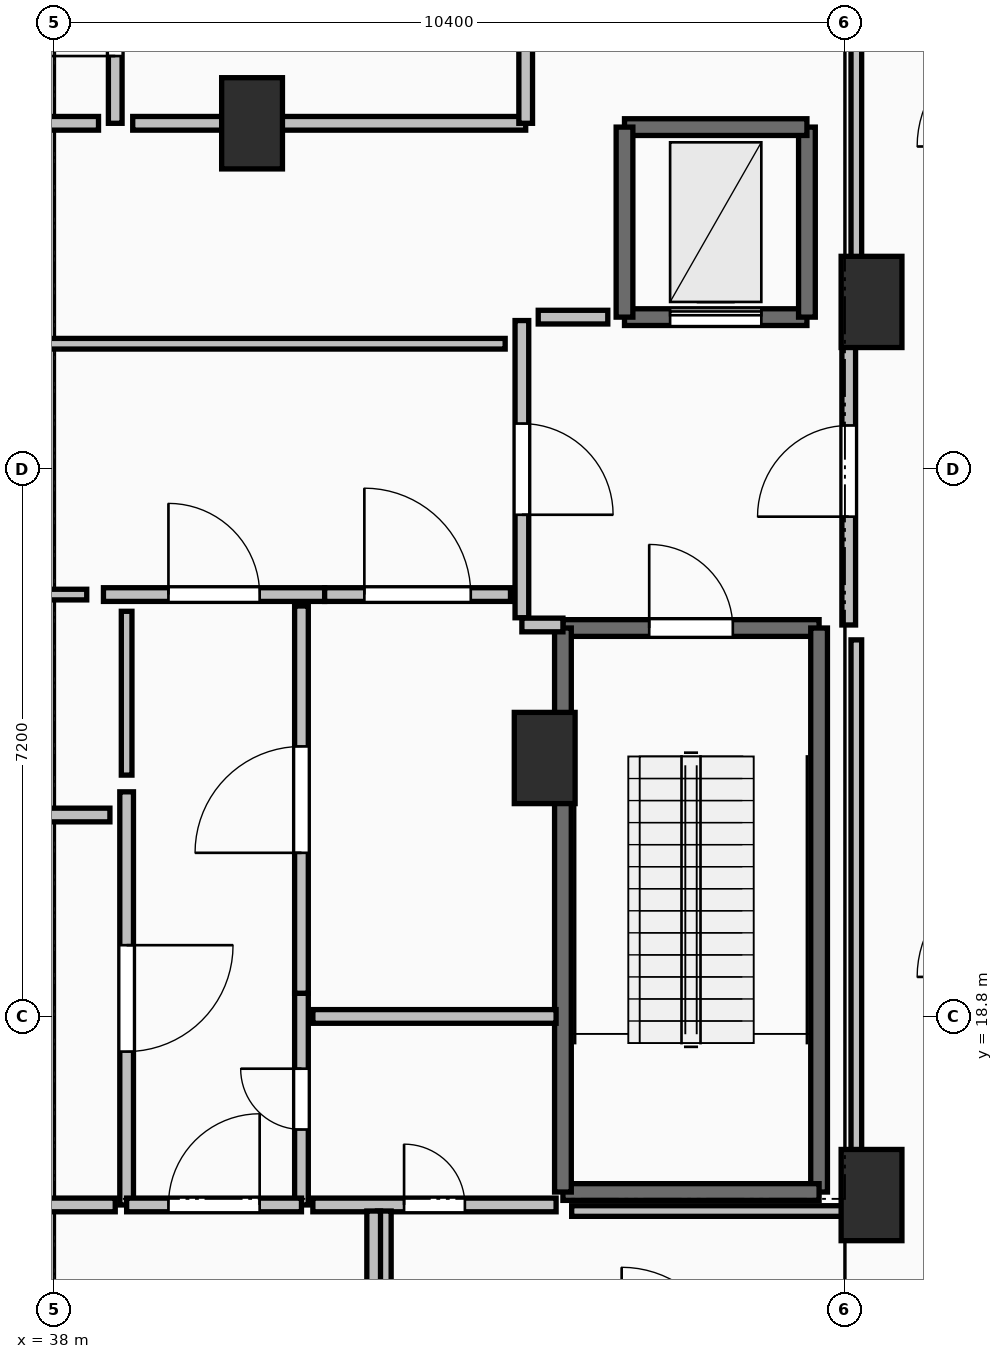
"""IFC4 building model, lengths in metres.
Left out: names, types, materials, properties, quantities, classifications, styles, units other than length and angle.
Written with IfcOpenShell. Run it as: python <this file> out.ifc"""

import sys

from ifc_helpers import new_model, si_unit, direction, frame, frame_2d, origin, origin_2d, place, context, subcontext, project, spatial, rectangle, extrude, element, fill, save


model = new_model("IFC4")
c1 = context("Model", 3, precision=1e-05, world=origin(), true_north=direction((0.0, 1.0)))
c2 = subcontext(c1, "Body", "Model", "MODEL_VIEW")
j1 = project(units=[si_unit("LENGTHUNIT", "METRE"), si_unit("PLANEANGLEUNIT", "RADIAN")], contexts=[c1])
p1 = place(None, origin())
s1 = spatial("IfcSite", under=j1, at=p1, CompositionType="ELEMENT")
p2 = place(p1, origin())
s2 = spatial("IfcBuilding", under=s1, at=p2, CompositionType="ELEMENT")
p3 = place(p2, frame((0.0, 0.0, -9.6)))
s3 = spatial("IfcBuildingStorey", under=s2, at=p3, CompositionType="ELEMENT", Elevation=-9.6)
for number, where, z_axis, x_axis in (
    (1, (48.75, 28.2, 0.0), (0.0, 0.0, 1.0), (1.0, 0.0, 0.0)),
    (2, (48.75, 16.45, 0.0), (0.0, 0.0, 1.0), (1.0, 0.0, 0.0)),
    (3, (44.45, 22.2, 0.0), (0.0, 0.0, 1.0), (1.0, 0.0, 0.0)),
    (4, (40.6, 30.55, 0.0), (0.0, 0.0, 1.0), (1.0, 0.0, 0.0)),
):
    element("IfcColumn", number, at=place(p3, frame(where, z_axis=z_axis, x_axis=x_axis)), inside=s3, PredefinedType="PILASTER", context=c2, shape_type="SweptSolid", body=[
        extrude(rectangle(XDim=0.8, YDim=1.2, at=origin_2d()), origin(), (0.0, 0.0, 1.0), 4.8),
    ])
p4 = place(p3, frame((44.69, 23.91, 0.0), z_axis=(0.0, 0.0, 1.0), x_axis=(1.0, 0.0, 0.0)))
e5 = element("IfcWall", 5, at=p4, inside=s3, PredefinedType="SOLIDWALL", context=c2, shape_type="SweptSolid", body=[
    extrude(rectangle(XDim=3.37, YDim=0.22, at=frame_2d((1.685, 0.0))), origin(), (0.0, 0.0, 1.0), 4.45),
])
p5 = place(p4, frame((1.135, 0.0, 0.0)))
e6 = element("IfcOpeningElement", 6, at=p5, cuts=e5, PredefinedType="OPENING", context=c2, shape_type="SweptSolid", body=[
    extrude(rectangle(XDim=1.1, YDim=2.15, at=frame_2d((0.55, 1.075))), frame((0.0, 0.125, 0.0), z_axis=(0.0, -1.0, 0.0), x_axis=(1.0, 0.0, 0.0)), (0.0, 0.0, 1.0), 0.25),
])
p6 = place(p3, frame((48.06, 23.91, 0.0), z_axis=(0.0, 0.0, 1.0), x_axis=(0.0, -1.0, 0.0)))
e7 = element("IfcWall", 7, at=p6, inside=s3, PredefinedType="SOLIDWALL", context=c2, shape_type="SweptSolid", body=[
    extrude(rectangle(XDim=7.42, YDim=0.22, at=frame_2d((3.71, 0.0))), origin(), (0.0, 0.0, 1.0), 4.45),
])
p7 = place(p3, frame((48.06, 16.49, 0.0), z_axis=(0.0, 0.0, 1.0), x_axis=(-1.0, 0.0, 0.0)))
e8 = element("IfcWall", 8, at=p7, inside=s3, PredefinedType="SOLIDWALL", context=c2, shape_type="SweptSolid", body=[
    extrude(rectangle(XDim=3.37, YDim=0.22, at=frame_2d((1.685, 0.0))), origin(), (0.0, 0.0, 1.0), 4.45),
])
p8 = place(p3, frame((44.69, 16.49, 0.0), z_axis=(0.0, 0.0, 1.0), x_axis=(0.0, 1.0, 0.0)))
e9 = element("IfcWall", 9, at=p8, inside=s3, PredefinedType="SOLIDWALL", context=c2, shape_type="SweptSolid", body=[
    extrude(rectangle(XDim=7.42, YDim=0.22, at=frame_2d((3.71, 0.0))), origin(), (0.0, 0.0, 1.0), 4.45),
])
p9 = place(p3, frame((45.5, 28.0, 0.0), z_axis=(0.0, 0.0, 1.0), x_axis=(1.0, 0.0, 0.0)))
e10 = element("IfcWall", 10, at=p9, inside=s3, PredefinedType="SHEAR", context=c2, shape_type="SweptSolid", body=[
    extrude(rectangle(XDim=2.4, YDim=0.22, at=frame_2d((1.2, 0.0))), origin(), (0.0, 0.0, 1.0), 4.45),
])
p10 = place(p9, frame((0.6, 0.0, 0.0)))
e11 = element("IfcOpeningElement", 11, at=p10, cuts=e10, PredefinedType="OPENING", context=c2, shape_type="SweptSolid", body=[
    extrude(rectangle(XDim=1.2, YDim=2.2, at=frame_2d((0.6, 1.1))), frame((0.0, 0.125, 0.0), z_axis=(0.0, -1.0, 0.0), x_axis=(1.0, 0.0, 0.0)), (0.0, 0.0, 1.0), 0.25),
])
p11 = place(p3, frame((47.9, 28.0, 0.0), z_axis=(0.0, 0.0, 1.0), x_axis=(0.0, 1.0, 0.0)))
e12 = element("IfcWall", 12, at=p11, inside=s3, PredefinedType="SHEAR", context=c2, shape_type="SweptSolid", body=[
    extrude(rectangle(XDim=2.5, YDim=0.22, at=frame_2d((1.25, 0.0))), origin(), (0.0, 0.0, 1.0), 4.45),
])
p12 = place(p3, frame((47.9, 30.5, 0.0), z_axis=(0.0, 0.0, 1.0), x_axis=(-1.0, 0.0, 0.0)))
e13 = element("IfcWall", 13, at=p12, inside=s3, PredefinedType="SHEAR", context=c2, shape_type="SweptSolid", body=[
    extrude(rectangle(XDim=2.4, YDim=0.22, at=frame_2d((1.2, 0.0))), origin(), (0.0, 0.0, 1.0), 4.45),
])
p13 = place(p3, frame((45.5, 30.5, 0.0), z_axis=(0.0, 0.0, 1.0), x_axis=(0.0, -1.0, 0.0)))
e14 = element("IfcWall", 14, at=p13, inside=s3, PredefinedType="SHEAR", context=c2, shape_type="SweptSolid", body=[
    extrude(rectangle(XDim=2.5, YDim=0.22, at=frame_2d((1.25, 0.0))), origin(), (0.0, 0.0, 1.0), 4.45),
])
p14 = place(p3, frame((44.15, 27.955, 0.0), z_axis=(0.0, 0.0, 1.0), x_axis=(0.0, -1.0, 0.0)))
e15 = element("IfcWall", 15, at=p14, inside=s3, PredefinedType="PARTITIONING", context=c2, shape_type="SweptSolid", body=[
    extrude(rectangle(XDim=3.91, YDim=0.18, at=frame_2d((1.955, 0.0))), origin(), (0.0, 0.0, 1.0), 4.45),
])
p15 = place(p14, frame((1.355, 0.0, 0.0)))
e16 = element("IfcOpeningElement", 16, at=p15, cuts=e15, PredefinedType="OPENING", context=c2, shape_type="SweptSolid", body=[
    extrude(rectangle(XDim=1.2, YDim=2.15, at=frame_2d((0.6, 1.075))), frame((0.0, 0.105, 0.0), z_axis=(0.0, -1.0, 0.0), x_axis=(1.0, 0.0, 0.0)), (0.0, 0.0, 1.0), 0.21),
])
p16 = place(p3, frame((44.15, 23.95, 0.0), z_axis=(0.0, 0.0, 1.0), x_axis=(1.0, 0.0, 0.0)))
e17 = element("IfcWall", 17, at=p16, inside=s3, PredefinedType="PARTITIONING", context=c2, shape_type="SweptSolid", body=[
    extrude(rectangle(XDim=0.54, YDim=0.18, at=frame_2d((0.27, 0.0))), origin(), (0.0, 0.0, 1.0), 4.45),
])
p17 = place(p3, frame((48.45, 23.95, 0.0), z_axis=(0.0, 0.0, 1.0), x_axis=(0.0, 1.0, 0.0)))
e18 = element("IfcWall", 18, at=p17, inside=s3, PredefinedType="PARTITIONING", context=c2, shape_type="SweptSolid", body=[
    extrude(rectangle(XDim=4.05, YDim=0.18, at=frame_2d((2.025, 0.0))), origin(), (0.0, 0.0, 1.0), 3.03),
])
p18 = place(p17, frame((1.425, 0.0, 0.0)))
e19 = element("IfcOpeningElement", 19, at=p18, cuts=e18, PredefinedType="OPENING", context=c2, shape_type="SweptSolid", body=[
    extrude(rectangle(XDim=1.2, YDim=2.15, at=frame_2d((0.6, 1.075))), frame((0.0, 0.105, 0.0), z_axis=(0.0, -1.0, 0.0), x_axis=(1.0, 0.0, 0.0)), (0.0, 0.0, 1.0), 0.21),
])
p19 = place(p3, frame((38.645, 24.35, 0.0), z_axis=(0.0, 0.0, 1.0), x_axis=(1.0, 0.0, 0.0)))
e20 = element("IfcWall", 20, at=p19, inside=s3, PredefinedType="PARTITIONING", context=c2, shape_type="SweptSolid", body=[
    extrude(rectangle(XDim=2.91, YDim=0.18, at=frame_2d((1.455, 0.0))), origin(), (0.0, 0.0, 1.0), 4.45),
])
p20 = place(p19, frame((0.855, 0.0, 0.0)))
e21 = element("IfcOpeningElement", 21, at=p20, cuts=e20, PredefinedType="OPENING", context=c2, shape_type="SweptSolid", body=[
    extrude(rectangle(XDim=1.2, YDim=2.15, at=frame_2d((0.6, 1.075))), frame((0.0, 0.105, 0.0), z_axis=(0.0, -1.0, 0.0), x_axis=(1.0, 0.0, 0.0)), (0.0, 0.0, 1.0), 0.21),
])
p21 = place(p3, frame((41.555, 24.35, 0.0), z_axis=(0.0, 0.0, 1.0), x_axis=(1.0, 0.0, 0.0)))
e22 = element("IfcWall", 22, at=p21, inside=s3, PredefinedType="PARTITIONING", context=c2, shape_type="SweptSolid", body=[
    extrude(rectangle(XDim=2.445, YDim=0.18, at=frame_2d((1.223, 0.0))), origin(), (0.0, 0.0, 1.0), 4.45),
])
p22 = place(p21, frame((0.522, 0.0, 0.0)))
e23 = element("IfcOpeningElement", 23, at=p22, cuts=e22, PredefinedType="OPENING", context=c2, shape_type="SweptSolid", body=[
    extrude(rectangle(XDim=1.4, YDim=2.2, at=frame_2d((0.7, 1.1))), frame((0.0, 0.105, 0.0), z_axis=(0.0, -1.0, 0.0), x_axis=(1.0, 0.0, 0.0)), (0.0, 0.0, 1.0), 0.21),
])
p23 = place(p3, frame((38.95, 21.755, 0.0), z_axis=(0.0, 0.0, 1.0), x_axis=(0.0, -1.0, 0.0)))
e24 = element("IfcWall", 24, at=p23, inside=s3, PredefinedType="PARTITIONING", context=c2, shape_type="SweptSolid", body=[
    extrude(rectangle(XDim=5.435, YDim=0.18, at=frame_2d((2.717, 0.0))), origin(), (0.0, 0.0, 1.0), 3.03),
])
p24 = place(p23, frame((2.018, 0.0, 0.0)))
e25 = element("IfcOpeningElement", 25, at=p24, cuts=e24, PredefinedType="OPENING", context=c2, shape_type="SweptSolid", body=[
    extrude(rectangle(XDim=1.4, YDim=2.2, at=frame_2d((0.7, 1.1))), frame((0.0, 0.105, 0.0), z_axis=(0.0, -1.0, 0.0), x_axis=(1.0, 0.0, 0.0)), (0.0, 0.0, 1.0), 0.21),
])
p25 = place(p3, frame((41.25, 16.32, 0.0), z_axis=(0.0, 0.0, 1.0), x_axis=(0.0, 1.0, 0.0)))
e26 = element("IfcWall", 26, at=p25, inside=s3, PredefinedType="PARTITIONING", context=c2, shape_type="SweptSolid", body=[
    extrude(rectangle(XDim=2.785, YDim=0.18, at=frame_2d((1.393, 0.0))), origin(), (0.0, 0.0, 1.0), 4.45),
])
p26 = place(p25, frame((0.992, 0.0, 0.0)))
e27 = element("IfcOpeningElement", 27, at=p26, cuts=e26, PredefinedType="OPENING", context=c2, shape_type="SweptSolid", body=[
    extrude(rectangle(XDim=0.8, YDim=2.05, at=frame_2d((0.4, 1.025))), frame((0.0, 0.105, 0.0), z_axis=(0.0, -1.0, 0.0), x_axis=(1.0, 0.0, 0.0)), (0.0, 0.0, 1.0), 0.21),
])
p27 = place(p3, frame((41.25, 19.105, 0.0), z_axis=(0.0, 0.0, 1.0), x_axis=(0.0, 1.0, 0.0)))
e28 = element("IfcWall", 28, at=p27, inside=s3, PredefinedType="PARTITIONING", context=c2, shape_type="SweptSolid", body=[
    extrude(rectangle(XDim=5.095, YDim=0.18, at=frame_2d((2.547, 0.0))), origin(), (0.0, 0.0, 1.0), 3.03),
])
p28 = place(p27, frame((1.847, 0.0, 0.0)))
e29 = element("IfcOpeningElement", 29, at=p28, cuts=e28, PredefinedType="OPENING", context=c2, shape_type="SweptSolid", body=[
    extrude(rectangle(XDim=1.4, YDim=2.2, at=frame_2d((0.7, 1.1))), frame((0.0, 0.105, 0.0), z_axis=(0.0, -1.0, 0.0), x_axis=(1.0, 0.0, 0.0)), (0.0, 0.0, 1.0), 0.21),
])
p29 = place(p3, frame((38.95, 16.32, 0.0), z_axis=(0.0, 0.0, 1.0), x_axis=(1.0, 0.0, 0.0)))
e30 = element("IfcWall", 30, at=p29, inside=s3, PredefinedType="PARTITIONING", context=c2, shape_type="SweptSolid", body=[
    extrude(rectangle(XDim=2.3, YDim=0.18, at=frame_2d((1.15, 0.0))), origin(), (0.0, 0.0, 1.0), 4.45),
])
p30 = place(p29, frame((0.55, 0.0, 0.0)))
e31 = element("IfcOpeningElement", 31, at=p30, cuts=e30, PredefinedType="OPENING", context=c2, shape_type="SweptSolid", body=[
    extrude(rectangle(XDim=1.2, YDim=2.15, at=frame_2d((0.6, 1.075))), frame((0.0, 0.105, 0.0), z_axis=(0.0, -1.0, 0.0), x_axis=(1.0, 0.0, 0.0)), (0.0, 0.0, 1.0), 0.21),
])
p31 = place(p3, frame((38.8, 30.55, 0.0), z_axis=(0.0, 0.0, 1.0), x_axis=(0.0, 1.0, 0.0)))
e32 = element("IfcWall", 32, at=p31, inside=s3, PredefinedType="PARTITIONING", context=c2, shape_type="SweptSolid", body=[
    extrude(rectangle(XDim=3.17, YDim=0.18, at=frame_2d((1.585, 0.0))), origin(), (0.0, 0.0, 1.0), 3.03),
])
p32 = place(p31, frame((0.885, 0.0, 0.0)))
e33 = element("IfcOpeningElement", 33, at=p32, cuts=e32, PredefinedType="OPENING", context=c2, shape_type="SweptSolid", body=[
    extrude(rectangle(XDim=1.4, YDim=2.2, at=frame_2d((0.7, 1.1))), frame((0.0, 0.105, 0.0), z_axis=(0.0, -1.0, 0.0), x_axis=(1.0, 0.0, 0.0)), (0.0, 0.0, 1.0), 0.21),
])
p33 = place(p3, frame((31.4, 16.32, 0.0), z_axis=(0.0, 0.0, 1.0), x_axis=(1.0, 0.0, 0.0)))
e34 = element("IfcWall", 34, at=p33, inside=s3, PredefinedType="PARTITIONING", context=c2, shape_type="SweptSolid", body=[
    extrude(rectangle(XDim=7.4, YDim=0.18, at=frame_2d((3.7, 0.0))), origin(), (0.0, 0.0, 1.0), 4.45),
])
p34 = place(p33, frame((3.0, 0.0, 0.0)))
e35 = element("IfcOpeningElement", 35, at=p34, cuts=e34, PredefinedType="OPENING", context=c2, shape_type="SweptSolid", body=[
    extrude(rectangle(XDim=1.4, YDim=2.2, at=frame_2d((0.7, 1.1))), frame((0.0, 0.105, 0.0), z_axis=(0.0, -1.0, 0.0), x_axis=(1.0, 0.0, 0.0)), (0.0, 0.0, 1.0), 0.21),
])
p35 = place(p3, frame((44.6, 18.8, 0.0), z_axis=(0.0, 0.0, 1.0), x_axis=(-1.0, 0.0, 0.0)))
e36 = element("IfcWall", 36, at=p35, inside=s3, PredefinedType="PARTITIONING", context=c2, shape_type="SweptSolid", body=[
    extrude(rectangle(XDim=3.2, YDim=0.18, at=frame_2d((1.6, 0.0))), origin(), (0.0, 0.0, 1.0), 4.45),
])
p36 = place(p3, frame((41.4, 16.32, 0.0), z_axis=(0.0, 0.0, 1.0), x_axis=(1.0, 0.0, 0.0)))
e37 = element("IfcWall", 37, at=p36, inside=s3, PredefinedType="PARTITIONING", context=c2, shape_type="SweptSolid", body=[
    extrude(rectangle(XDim=3.2, YDim=0.18, at=frame_2d((1.6, 0.0))), origin(), (0.0, 0.0, 1.0), 4.45),
])
p37 = place(p36, frame((1.2, 0.0, 0.0)))
e38 = element("IfcOpeningElement", 38, at=p37, cuts=e37, PredefinedType="OPENING", context=c2, shape_type="SweptSolid", body=[
    extrude(rectangle(XDim=0.8, YDim=2.05, at=frame_2d((0.4, 1.025))), frame((0.0, 0.105, 0.0), z_axis=(0.0, -1.0, 0.0), x_axis=(1.0, 0.0, 0.0)), (0.0, 0.0, 1.0), 0.21),
])
for number, where, z_axis, x_axis in (
    (39, (42.34, 16.24, 0.0), (0.0, 0.0, 1.0), (0.0, -1.0, 0.0)),
    (40, (42.2, 14.1, 0.0), (0.0, 0.0, 1.0), (0.0, 1.0, 0.0)),
):
    element("IfcWall", number, at=place(p3, frame(where, z_axis=z_axis, x_axis=x_axis)), inside=s3, PredefinedType="PARTITIONING", context=c2, shape_type="SweptSolid", body=[
        extrude(rectangle(XDim=2.14, YDim=0.18, at=frame_2d((1.07, 0.0))), origin(), (0.0, 0.0, 1.0), 4.45),
    ])
p38 = place(p3, frame((45.28, 28.0, 0.0), z_axis=(0.0, 0.0, 1.0), x_axis=(-1.0, 0.0, 0.0)))
e41 = element("IfcWall", 41, at=p38, inside=s3, PredefinedType="PARTITIONING", context=c2, shape_type="SweptSolid", body=[
    extrude(rectangle(XDim=0.915, YDim=0.18, at=frame_2d((0.458, 0.0))), origin(), (0.0, 0.0, 1.0), 4.45),
])
p39 = place(p3, frame((43.93, 27.65, 0.0), z_axis=(0.0, 0.0, 1.0), x_axis=(-1.0, 0.0, 0.0)))
e42 = element("IfcWall", 42, at=p39, inside=s3, PredefinedType="PARTITIONING", context=c2, shape_type="SweptSolid", body=[
    extrude(rectangle(XDim=11.86, YDim=0.14, at=frame_2d((5.93, 0.0))), origin(), (0.0, 0.0, 1.0), 4.45),
])
p40 = place(p3, frame((32.07, 24.35, 0.0), z_axis=(0.0, 0.0, 1.0), x_axis=(1.0, 0.0, 0.0)))
e43 = element("IfcWall", 43, at=p40, inside=s3, PredefinedType="PARTITIONING", context=c2, shape_type="SweptSolid", body=[
    extrude(rectangle(XDim=6.355, YDim=0.14, at=frame_2d((3.177, 0.0))), origin(), (0.0, 0.0, 1.0), 4.45),
])
p41 = place(p3, frame((38.95, 24.13, 0.0), z_axis=(0.0, 0.0, 1.0), x_axis=(0.0, -1.0, 0.0)))
e44 = element("IfcWall", 44, at=p41, inside=s3, PredefinedType="PARTITIONING", context=c2, shape_type="SweptSolid", body=[
    extrude(rectangle(XDim=2.155, YDim=0.14, at=frame_2d((1.077, 0.0))), origin(), (0.0, 0.0, 1.0), 3.03),
])
p42 = place(p3, frame((33.694, 30.55, 0.0), z_axis=(0.0, 0.0, 1.0), x_axis=(1.0, 0.0, 0.0)))
e45 = element("IfcWall", 45, at=p42, inside=s3, PredefinedType="PARTITIONING", context=c2, shape_type="SweptSolid", body=[
    extrude(rectangle(XDim=4.886, YDim=0.18, at=frame_2d((2.443, 0.0))), origin(), (0.0, 0.0, 1.0), 3.03),
])
p43 = place(p3, frame((39.03, 30.55, 0.0), z_axis=(0.0, 0.0, 1.0), x_axis=(1.0, 0.0, 0.0)))
e46 = element("IfcWall", 46, at=p43, inside=s3, PredefinedType="PARTITIONING", context=c2, shape_type="SweptSolid", body=[
    extrude(rectangle(XDim=5.17, YDim=0.18, at=frame_2d((2.585, 0.0))), origin(), (0.0, 0.0, 1.0), 3.03),
])
p44 = place(p3, frame((44.2, 30.55, 0.0), z_axis=(0.0, 0.0, 1.0), x_axis=(0.0, 1.0, 0.0)))
e47 = element("IfcWall", 47, at=p44, inside=s3, PredefinedType="PARTITIONING", context=c2, shape_type="SweptSolid", body=[
    extrude(rectangle(XDim=2.34, YDim=0.18, at=frame_2d((1.17, 0.0))), origin(), (0.0, 0.0, 1.0), 4.45),
])
p45 = place(p3, frame((38.73, 21.45, 0.0), z_axis=(0.0, 0.0, 1.0), x_axis=(-1.0, 0.0, 0.0)))
e48 = element("IfcWall", 48, at=p45, inside=s3, PredefinedType="PARTITIONING", context=c2, shape_type="SweptSolid", body=[
    extrude(rectangle(XDim=7.2, YDim=0.18, at=frame_2d((3.6, 0.0))), origin(), (0.0, 0.0, 1.0), 4.45),
])
p46 = place(p3, frame((48.55, 33.45, 0.0), z_axis=(0.0, 0.0, 1.0), x_axis=(0.0, -1.0, 0.0)))
e49 = element("IfcWall", 49, at=p46, inside=s3, PredefinedType="PARTITIONING", context=c2, shape_type="SweptSolid", body=[
    extrude(rectangle(XDim=5.254, YDim=0.14, at=frame_2d((2.627, 0.0))), origin(), (0.0, 0.0, 1.0), 3.03),
])
p47 = place(p3, frame((48.55, 23.754, 0.0), z_axis=(0.0, 0.0, 1.0), x_axis=(0.0, -1.0, 0.0)))
e50 = element("IfcWall", 50, at=p47, inside=s3, PredefinedType="PARTITIONING", context=c2, shape_type="SweptSolid", body=[
    extrude(rectangle(XDim=7.514, YDim=0.14, at=frame_2d((3.757, 0.0))), origin(), (0.0, 0.0, 1.0), 3.03),
])
p48 = place(p3, frame((48.55, 16.24, 0.0), z_axis=(0.0, 0.0, 1.0), x_axis=(-1.0, 0.0, 0.0)))
e51 = element("IfcWall", 51, at=p48, inside=s3, PredefinedType="PARTITIONING", context=c2, shape_type="SweptSolid", body=[
    extrude(rectangle(XDim=3.745, YDim=0.14, at=frame_2d((1.873, 0.0))), origin(), (0.0, 0.0, 1.0), 3.642),
])
p49 = place(p5, origin())
e52 = element("IfcDoor", 52, at=p49, inside=s3, OperationType="SINGLE_SWING_LEFT", PredefinedType="DOOR", context=c2, shape_type="SweptSolid", body=[
    extrude(rectangle(XDim=1.1, YDim=2.15, at=frame_2d((0.55, 1.075))), frame((0.0, 0.025, 0.0), z_axis=(0.0, -1.0, 0.0), x_axis=(1.0, 0.0, 0.0)), (0.0, 0.0, 1.0), 0.05),
])
fill(e6, e52)
p50 = place(p10, origin())
e53 = element("IfcDoor", 53, at=p50, inside=s3, OperationType="SLIDING_TO_LEFT", PredefinedType="DOOR", context=c2, shape_type="SweptSolid", body=[
    extrude(rectangle(XDim=1.2, YDim=2.2, at=frame_2d((0.6, 1.1))), frame((0.0, 0.025, 0.0), z_axis=(0.0, -1.0, 0.0), x_axis=(1.0, 0.0, 0.0)), (0.0, 0.0, 1.0), 0.05),
])
fill(e11, e53)
p51 = place(p15, origin())
e54 = element("IfcDoor", 54, at=p51, inside=s3, OperationType="SINGLE_SWING_RIGHT", PredefinedType="DOOR", context=c2, shape_type="SweptSolid", body=[
    extrude(rectangle(XDim=1.2, YDim=2.15, at=frame_2d((0.6, 1.075))), frame((0.0, 0.025, 0.0), z_axis=(0.0, -1.0, 0.0), x_axis=(1.0, 0.0, 0.0)), (0.0, 0.0, 1.0), 0.05),
])
fill(e16, e54)
p52 = place(p18, origin())
e55 = element("IfcDoor", 55, at=p52, inside=s3, OperationType="SINGLE_SWING_LEFT", PredefinedType="DOOR", context=c2, shape_type="SweptSolid", body=[
    extrude(rectangle(XDim=1.2, YDim=2.15, at=frame_2d((0.6, 1.075))), frame((0.0, 0.025, 0.0), z_axis=(0.0, -1.0, 0.0), x_axis=(1.0, 0.0, 0.0)), (0.0, 0.0, 1.0), 0.05),
])
fill(e19, e55)
p53 = place(p20, origin())
e56 = element("IfcDoor", 56, at=p53, inside=s3, OperationType="SINGLE_SWING_LEFT", PredefinedType="DOOR", context=c2, shape_type="SweptSolid", body=[
    extrude(rectangle(XDim=1.2, YDim=2.15, at=frame_2d((0.6, 1.075))), frame((0.0, 0.025, 0.0), z_axis=(0.0, -1.0, 0.0), x_axis=(1.0, 0.0, 0.0)), (0.0, 0.0, 1.0), 0.05),
])
fill(e21, e56)
p54 = place(p22, origin())
e57 = element("IfcDoor", 57, at=p54, inside=s3, OperationType="DOUBLE_SWING_LEFT", PredefinedType="DOOR", context=c2, shape_type="SweptSolid", body=[
    extrude(rectangle(XDim=1.4, YDim=2.2, at=frame_2d((0.7, 1.1))), frame((0.0, 0.025, 0.0), z_axis=(0.0, -1.0, 0.0), x_axis=(1.0, 0.0, 0.0)), (0.0, 0.0, 1.0), 0.05),
])
fill(e23, e57)
p55 = place(p24, origin())
e58 = element("IfcDoor", 58, at=p55, inside=s3, OperationType="DOUBLE_SWING_LEFT", PredefinedType="DOOR", context=c2, shape_type="SweptSolid", body=[
    extrude(rectangle(XDim=1.4, YDim=2.2, at=frame_2d((0.7, 1.1))), frame((0.0, 0.025, 0.0), z_axis=(0.0, -1.0, 0.0), x_axis=(1.0, 0.0, 0.0)), (0.0, 0.0, 1.0), 0.05),
])
fill(e25, e58)
p56 = place(p26, origin())
e59 = element("IfcDoor", 59, at=p56, inside=s3, OperationType="SINGLE_SWING_RIGHT", PredefinedType="DOOR", context=c2, shape_type="SweptSolid", body=[
    extrude(rectangle(XDim=0.8, YDim=2.05, at=frame_2d((0.4, 1.025))), frame((0.0, 0.025, 0.0), z_axis=(0.0, -1.0, 0.0), x_axis=(1.0, 0.0, 0.0)), (0.0, 0.0, 1.0), 0.05),
])
fill(e27, e59)
p57 = place(p28, origin())
e60 = element("IfcDoor", 60, at=p57, inside=s3, OperationType="DOUBLE_SWING_LEFT", PredefinedType="DOOR", context=c2, shape_type="SweptSolid", body=[
    extrude(rectangle(XDim=1.4, YDim=2.2, at=frame_2d((0.7, 1.1))), frame((0.0, 0.025, 0.0), z_axis=(0.0, -1.0, 0.0), x_axis=(1.0, 0.0, 0.0)), (0.0, 0.0, 1.0), 0.05),
])
fill(e29, e60)
p58 = place(p30, origin())
e61 = element("IfcDoor", 61, at=p58, inside=s3, OperationType="SINGLE_SWING_RIGHT", PredefinedType="DOOR", context=c2, shape_type="SweptSolid", body=[
    extrude(rectangle(XDim=1.2, YDim=2.15, at=frame_2d((0.6, 1.075))), frame((0.0, 0.025, 0.0), z_axis=(0.0, -1.0, 0.0), x_axis=(1.0, 0.0, 0.0)), (0.0, 0.0, 1.0), 0.05),
])
fill(e31, e61)
p59 = place(p32, origin())
e62 = element("IfcDoor", 62, at=p59, inside=s3, OperationType="DOUBLE_SWING_LEFT", PredefinedType="DOOR", context=c2, shape_type="SweptSolid", body=[
    extrude(rectangle(XDim=1.4, YDim=2.2, at=frame_2d((0.7, 1.1))), frame((0.0, 0.025, 0.0), z_axis=(0.0, -1.0, 0.0), x_axis=(1.0, 0.0, 0.0)), (0.0, 0.0, 1.0), 0.05),
])
fill(e33, e62)
p60 = place(p37, origin())
e63 = element("IfcDoor", 63, at=p60, inside=s3, OperationType="SINGLE_SWING_LEFT", PredefinedType="DOOR", context=c2, shape_type="SweptSolid", body=[
    extrude(rectangle(XDim=0.8, YDim=2.05, at=frame_2d((0.4, 1.025))), frame((0.0, 0.025, 0.0), z_axis=(0.0, -1.0, 0.0), x_axis=(1.0, 0.0, 0.0)), (0.0, 0.0, 1.0), 0.05),
])
fill(e38, e63)
save(model, sys.argv[1])
